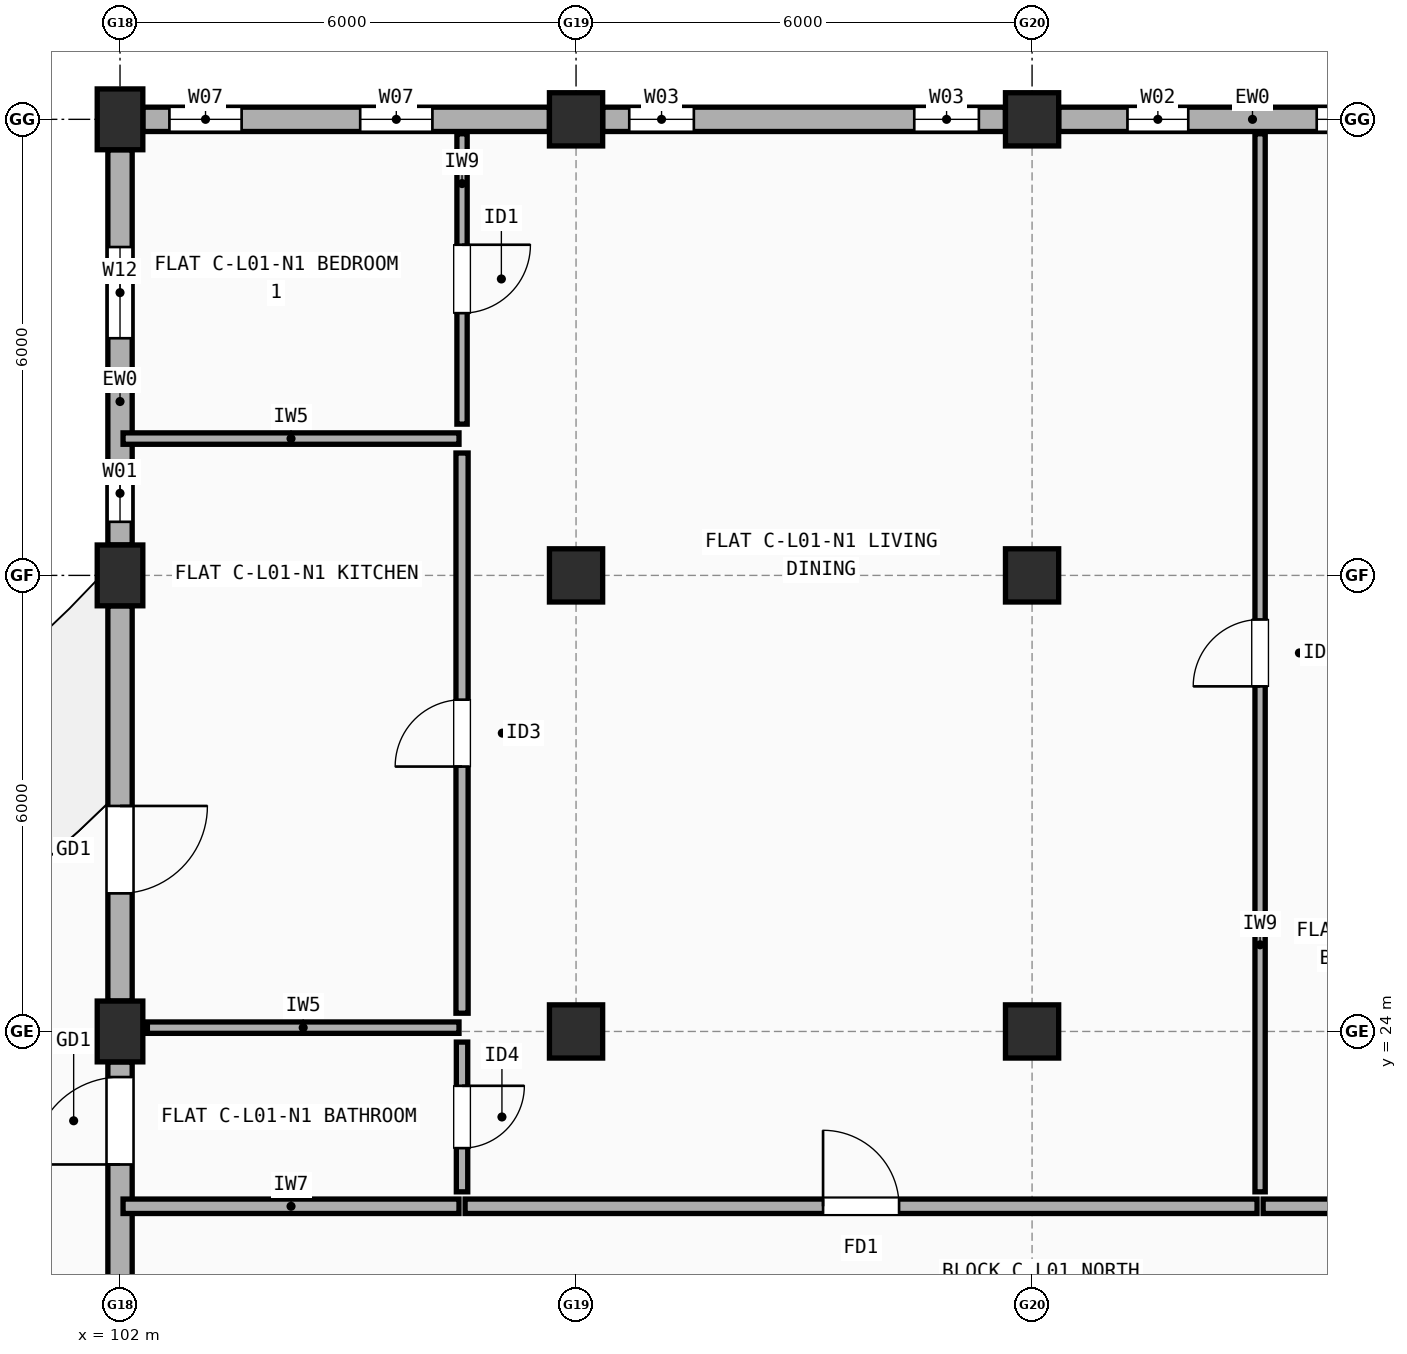
"""IFC4 building model, lengths in metres.
Left out: names, types, materials, properties, quantities, classifications, styles, units other than length and angle.
Written with IfcOpenShell. Run it as: python <this file> out.ifc"""

import sys

from ifc_helpers import new_model, si_unit, direction, frame, frame_2d, origin, origin_2d, place, context, subcontext, project, spatial, rectangle, extrude, element, fill, save


model = new_model("IFC4")
c1 = context("Model", 3, precision=1e-05, world=origin(), true_north=direction((0.0, 1.0)))
c2 = subcontext(c1, "Body", "Model", "MODEL_VIEW")
j1 = project(units=[si_unit("LENGTHUNIT", "METRE"), si_unit("PLANEANGLEUNIT", "RADIAN")], contexts=[c1])
p1 = place(None, origin())
s1 = spatial("IfcSite", under=j1, at=p1, CompositionType="ELEMENT")
p2 = place(p1, origin())
s2 = spatial("IfcBuilding", under=s1, at=p2, CompositionType="ELEMENT")
p3 = place(p2, frame((0.0, 0.0, 4.5)))
s3 = spatial("IfcBuildingStorey", under=s2, at=p3, CompositionType="ELEMENT", Elevation=4.5)
for number, where, z_axis, x_axis in (
    (1, (102.0, 24.0, 0.0), (0.0, 0.0, 1.0), (1.0, 0.0, 0.0)),
    (2, (102.0, 30.0, 0.0), (0.0, 0.0, 1.0), (1.0, 0.0, 0.0)),
    (3, (102.0, 36.0, 0.0), (0.0, 0.0, 1.0), (1.0, 0.0, 0.0)),
):
    element("IfcColumn", number, at=place(p3, frame(where, z_axis=z_axis, x_axis=x_axis)), inside=s3, PredefinedType="COLUMN", context=c2, shape_type="SweptSolid", body=[
        extrude(rectangle(XDim=0.6, YDim=0.8, at=origin_2d()), origin(), (0.0, 0.0, 1.0), 2.945),
    ])
for number, where, z_axis, x_axis in (
    (4, (108.0, 24.0, 0.0), (0.0, 0.0, 1.0), (1.0, 0.0, 0.0)),
    (5, (108.0, 30.0, 0.0), (0.0, 0.0, 1.0), (1.0, 0.0, 0.0)),
    (6, (108.0, 36.0, 0.0), (0.0, 0.0, 1.0), (1.0, 0.0, 0.0)),
    (7, (114.0, 24.0, 0.0), (0.0, 0.0, 1.0), (1.0, 0.0, 0.0)),
    (8, (114.0, 30.0, 0.0), (0.0, 0.0, 1.0), (1.0, 0.0, 0.0)),
    (9, (114.0, 36.0, 0.0), (0.0, 0.0, 1.0), (1.0, 0.0, 0.0)),
):
    element("IfcColumn", number, at=place(p3, frame(where, z_axis=z_axis, x_axis=x_axis)), inside=s3, PredefinedType="COLUMN", context=c2, shape_type="SweptSolid", body=[
        extrude(rectangle(XDim=0.7, YDim=0.7, at=origin_2d()), origin(), (0.0, 0.0, 1.0), 2.945),
    ])
p4 = place(p3, frame((119.65, 36.0, 0.0), z_axis=(0.0, 0.0, 1.0), x_axis=(-1.0, 0.0, 0.0)))
e10 = element("IfcWall", 10, at=p4, inside=s3, PredefinedType="STANDARD", context=c2, shape_type="SweptSolid", body=[
    extrude(rectangle(XDim=5.3, YDim=0.32, at=frame_2d((2.65, 0.0))), origin(), (0.0, 0.0, 1.0), 2.427),
])
p5 = place(p4, frame((0.705, 0.0, 0.9)))
e11 = element("IfcOpeningElement", 11, at=p5, cuts=e10, PredefinedType="OPENING", context=c2, shape_type="SweptSolid", body=[
    extrude(rectangle(XDim=1.2, YDim=1.35, at=frame_2d((0.6, 0.675))), frame((0.0, 0.17, 0.0), z_axis=(0.0, -1.0, 0.0), x_axis=(1.0, 0.0, 0.0)), (0.0, 0.0, 1.0), 0.34),
])
p6 = place(p4, frame((3.595, 0.0, 0.9)))
e12 = element("IfcOpeningElement", 12, at=p6, cuts=e10, PredefinedType="OPENING", context=c2, shape_type="SweptSolid", body=[
    extrude(rectangle(XDim=0.8, YDim=1.2, at=frame_2d((0.4, 0.6))), frame((0.0, 0.17, 0.0), z_axis=(0.0, -1.0, 0.0), x_axis=(1.0, 0.0, 0.0)), (0.0, 0.0, 1.0), 0.34),
])
p7 = place(p3, frame((113.65, 36.0, 0.0), z_axis=(0.0, 0.0, 1.0), x_axis=(-1.0, 0.0, 0.0)))
e13 = element("IfcWall", 13, at=p7, inside=s3, PredefinedType="STANDARD", context=c2, shape_type="SweptSolid", body=[
    extrude(rectangle(XDim=5.3, YDim=0.32, at=frame_2d((2.65, 0.0))), origin(), (0.0, 0.0, 1.0), 2.427),
])
p8 = place(p7, frame((0.35, 0.0, 0.9)))
e14 = element("IfcOpeningElement", 14, at=p8, cuts=e13, PredefinedType="OPENING", context=c2, shape_type="SweptSolid", body=[
    extrude(rectangle(XDim=0.85, YDim=1.25, at=frame_2d((0.425, 0.625))), frame((0.0, 0.17, 0.0), z_axis=(0.0, -1.0, 0.0), x_axis=(1.0, 0.0, 0.0)), (0.0, 0.0, 1.0), 0.34),
])
p9 = place(p7, frame((4.1, 0.0, 0.9)))
e15 = element("IfcOpeningElement", 15, at=p9, cuts=e13, PredefinedType="OPENING", context=c2, shape_type="SweptSolid", body=[
    extrude(rectangle(XDim=0.85, YDim=1.25, at=frame_2d((0.425, 0.625))), frame((0.0, 0.17, 0.0), z_axis=(0.0, -1.0, 0.0), x_axis=(1.0, 0.0, 0.0)), (0.0, 0.0, 1.0), 0.34),
])
p10 = place(p3, frame((107.65, 36.0, 0.0), z_axis=(0.0, 0.0, 1.0), x_axis=(-1.0, 0.0, 0.0)))
e16 = element("IfcWall", 16, at=p10, inside=s3, PredefinedType="STANDARD", context=c2, shape_type="SweptSolid", body=[
    extrude(rectangle(XDim=5.35, YDim=0.32, at=frame_2d((2.675, 0.0))), origin(), (0.0, 0.0, 1.0), 2.427),
])
p11 = place(p10, frame((1.54, 0.0, 0.9)))
e17 = element("IfcOpeningElement", 17, at=p11, cuts=e16, PredefinedType="OPENING", context=c2, shape_type="SweptSolid", body=[
    extrude(rectangle(XDim=0.95, YDim=1.35, at=frame_2d((0.475, 0.675))), frame((0.0, 0.17, 0.0), z_axis=(0.0, -1.0, 0.0), x_axis=(1.0, 0.0, 0.0)), (0.0, 0.0, 1.0), 0.34),
])
p12 = place(p10, frame((4.05, 0.0, 0.9)))
e18 = element("IfcOpeningElement", 18, at=p12, cuts=e16, PredefinedType="OPENING", context=c2, shape_type="SweptSolid", body=[
    extrude(rectangle(XDim=0.95, YDim=1.35, at=frame_2d((0.475, 0.675))), frame((0.0, 0.17, 0.0), z_axis=(0.0, -1.0, 0.0), x_axis=(1.0, 0.0, 0.0)), (0.0, 0.0, 1.0), 0.34),
])
p13 = place(p3, frame((102.0, 35.6, 0.0), z_axis=(0.0, 0.0, 1.0), x_axis=(0.0, -1.0, 0.0)))
e19 = element("IfcWall", 19, at=p13, inside=s3, PredefinedType="STANDARD", context=c2, shape_type="SweptSolid", body=[
    extrude(rectangle(XDim=5.2, YDim=0.32, at=frame_2d((2.6, 0.0))), origin(), (0.0, 0.0, 1.0), 2.427),
])
p14 = place(p13, frame((1.28, 0.0, 0.9)))
e20 = element("IfcOpeningElement", 20, at=p14, cuts=e19, PredefinedType="OPENING", context=c2, shape_type="SweptSolid", body=[
    extrude(rectangle(XDim=1.2, YDim=1.35, at=frame_2d((0.6, 0.675))), frame((0.0, 0.17, 0.0), z_axis=(0.0, -1.0, 0.0), x_axis=(1.0, 0.0, 0.0)), (0.0, 0.0, 1.0), 0.34),
])
p15 = place(p13, frame((4.145, 0.0, 0.9)))
e21 = element("IfcOpeningElement", 21, at=p15, cuts=e19, PredefinedType="OPENING", context=c2, shape_type="SweptSolid", body=[
    extrude(rectangle(XDim=0.75, YDim=1.15, at=frame_2d((0.375, 0.575))), frame((0.0, 0.17, 0.0), z_axis=(0.0, -1.0, 0.0), x_axis=(1.0, 0.0, 0.0)), (0.0, 0.0, 1.0), 0.34),
])
p16 = place(p3, frame((102.0, 29.6, 0.0), z_axis=(0.0, 0.0, 1.0), x_axis=(0.0, -1.0, 0.0)))
e22 = element("IfcWall", 22, at=p16, inside=s3, PredefinedType="STANDARD", context=c2, shape_type="SweptSolid", body=[
    extrude(rectangle(XDim=5.2, YDim=0.32, at=frame_2d((2.6, 0.0))), origin(), (0.0, 0.0, 1.0), 2.427),
])
p17 = place(p16, frame((2.633, 0.0, 0.0)))
e23 = element("IfcOpeningElement", 23, at=p17, cuts=e22, PredefinedType="OPENING", context=c2, shape_type="SweptSolid", body=[
    extrude(rectangle(XDim=1.15, YDim=2.15, at=frame_2d((0.575, 1.075))), frame((0.0, 0.17, 0.0), z_axis=(0.0, -1.0, 0.0), x_axis=(1.0, 0.0, 0.0)), (0.0, 0.0, 1.0), 0.34),
])
p18 = place(p3, frame((102.0, 23.6, 0.0), z_axis=(0.0, 0.0, 1.0), x_axis=(0.0, -1.0, 0.0)))
e24 = element("IfcWall", 24, at=p18, inside=s3, PredefinedType="STANDARD", context=c2, shape_type="SweptSolid", body=[
    extrude(rectangle(XDim=5.2, YDim=0.32, at=frame_2d((2.6, 0.0))), origin(), (0.0, 0.0, 1.0), 2.427),
])
p19 = place(p18, frame((0.2, 0.0, 0.0)))
e25 = element("IfcOpeningElement", 25, at=p19, cuts=e24, PredefinedType="OPENING", context=c2, shape_type="SweptSolid", body=[
    extrude(rectangle(XDim=1.15, YDim=2.15, at=frame_2d((0.575, 1.075))), frame((0.0, 0.17, 0.0), z_axis=(0.0, -1.0, 0.0), x_axis=(1.0, 0.0, 0.0)), (0.0, 0.0, 1.0), 0.34),
])
p20 = place(p18, frame((3.145, 0.0, 0.9)))
e26 = element("IfcOpeningElement", 26, at=p20, cuts=e24, PredefinedType="OPENING", context=c2, shape_type="SweptSolid", body=[
    extrude(rectangle(XDim=0.85, YDim=1.25, at=frame_2d((0.425, 0.625))), frame((0.0, 0.17, 0.0), z_axis=(0.0, -1.0, 0.0), x_axis=(1.0, 0.0, 0.0)), (0.0, 0.0, 1.0), 0.34),
])
p21 = place(p3, frame((102.04, 21.7, 0.0), z_axis=(0.0, 0.0, 1.0), x_axis=(1.0, 0.0, 0.0)))
e27 = element("IfcWall", 27, at=p21, inside=s3, PredefinedType="SOLIDWALL", context=c2, shape_type="SweptSolid", body=[
    extrude(rectangle(XDim=4.42, YDim=0.19, at=frame_2d((2.21, 0.0))), origin(), (0.0, 0.0, 1.0), 2.427),
])
p22 = place(p3, frame((106.54, 21.7, 0.0), z_axis=(0.0, 0.0, 1.0), x_axis=(1.0, 0.0, 0.0)))
e28 = element("IfcWall", 28, at=p22, inside=s3, PredefinedType="SOLIDWALL", context=c2, shape_type="SweptSolid", body=[
    extrude(rectangle(XDim=10.42, YDim=0.19, at=frame_2d((5.21, 0.0))), origin(), (0.0, 0.0, 1.0), 2.508),
])
p23 = place(p22, frame((4.71, 0.0, 0.0)))
e29 = element("IfcOpeningElement", 29, at=p23, cuts=e28, PredefinedType="OPENING", context=c2, shape_type="SweptSolid", body=[
    extrude(rectangle(XDim=1.0, YDim=2.15, at=frame_2d((0.5, 1.075))), frame((0.0, 0.105, 0.0), z_axis=(0.0, -1.0, 0.0), x_axis=(1.0, 0.0, 0.0)), (0.0, 0.0, 1.0), 0.21),
])
p24 = place(p3, frame((106.5, 31.99, 0.0), z_axis=(0.0, 0.0, 1.0), x_axis=(0.0, 1.0, 0.0)))
e30 = element("IfcWall", 30, at=p24, inside=s3, PredefinedType="PARTITIONING", context=c2, shape_type="SweptSolid", body=[
    extrude(rectangle(XDim=3.82, YDim=0.135, at=frame_2d((1.91, 0.0))), origin(), (0.0, 0.0, 1.0), 2.945),
])
p25 = place(p24, frame((1.46, 0.0, 0.0)))
e31 = element("IfcOpeningElement", 31, at=p25, cuts=e30, PredefinedType="OPENING", context=c2, shape_type="SweptSolid", body=[
    extrude(rectangle(XDim=0.9, YDim=2.1, at=frame_2d((0.45, 1.05))), frame((0.0, 0.077, 0.0), z_axis=(0.0, -1.0, 0.0), x_axis=(1.0, 0.0, 0.0)), (0.0, 0.0, 1.0), 0.155),
])
p26 = place(p3, frame((106.5, 24.24, 0.0), z_axis=(0.0, 0.0, 1.0), x_axis=(0.0, 1.0, 0.0)))
e32 = element("IfcWall", 32, at=p26, inside=s3, PredefinedType="PLUMBINGWALL", context=c2, shape_type="SweptSolid", body=[
    extrude(rectangle(XDim=7.37, YDim=0.16, at=frame_2d((3.685, 0.0))), origin(), (0.0, 0.0, 1.0), 2.427),
])
p27 = place(p26, frame((3.245, 0.0, 0.0)))
e33 = element("IfcOpeningElement", 33, at=p27, cuts=e32, PredefinedType="OPENING", context=c2, shape_type="SweptSolid", body=[
    extrude(rectangle(XDim=0.88, YDim=2.1, at=frame_2d((0.44, 1.05))), frame((0.0, 0.09, 0.0), z_axis=(0.0, -1.0, 0.0), x_axis=(1.0, 0.0, 0.0)), (0.0, 0.0, 1.0), 0.18),
])
p28 = place(p3, frame((106.5, 21.89, 0.0), z_axis=(0.0, 0.0, 1.0), x_axis=(0.0, 1.0, 0.0)))
e34 = element("IfcWall", 34, at=p28, inside=s3, PredefinedType="PARTITIONING", context=c2, shape_type="SweptSolid", body=[
    extrude(rectangle(XDim=1.97, YDim=0.15, at=frame_2d((0.985, 0.0))), origin(), (0.0, 0.0, 1.0), 2.945),
])
p29 = place(p28, frame((0.575, 0.0, 0.0)))
e35 = element("IfcOpeningElement", 35, at=p29, cuts=e34, PredefinedType="OPENING", context=c2, shape_type="SweptSolid", body=[
    extrude(rectangle(XDim=0.82, YDim=2.08, at=frame_2d((0.41, 1.04))), frame((0.0, 0.085, 0.0), z_axis=(0.0, -1.0, 0.0), x_axis=(1.0, 0.0, 0.0)), (0.0, 0.0, 1.0), 0.17),
])
p30 = place(p3, frame((102.04, 31.8, 0.0), z_axis=(0.0, 0.0, 1.0), x_axis=(1.0, 0.0, 0.0)))
e36 = element("IfcWall", 36, at=p30, inside=s3, PredefinedType="PARTITIONING", context=c2, shape_type="SweptSolid", body=[
    extrude(rectangle(XDim=4.42, YDim=0.15, at=frame_2d((2.21, 0.0))), origin(), (0.0, 0.0, 1.0), 2.427),
])
p31 = place(p3, frame((102.36, 24.05, 0.0), z_axis=(0.0, 0.0, 1.0), x_axis=(1.0, 0.0, 0.0)))
e37 = element("IfcWall", 37, at=p31, inside=s3, PredefinedType="PARTITIONING", context=c2, shape_type="SweptSolid", body=[
    extrude(rectangle(XDim=4.1, YDim=0.15, at=frame_2d((2.05, 0.0))), origin(), (0.0, 0.0, 1.0), 2.377),
])
p32 = place(p3, frame((117.04, 21.7, 0.0), z_axis=(0.0, 0.0, 1.0), x_axis=(1.0, 0.0, 0.0)))
e38 = element("IfcWall", 38, at=p32, inside=s3, PredefinedType="SOLIDWALL", context=c2, shape_type="SweptSolid", body=[
    extrude(rectangle(XDim=2.92, YDim=0.19, at=frame_2d((1.46, 0.0))), origin(), (0.0, 0.0, 1.0), 2.945),
])
p33 = place(p3, frame((117.0, 21.89, 0.0), z_axis=(0.0, 0.0, 1.0), x_axis=(0.0, 1.0, 0.0)))
e39 = element("IfcWall", 39, at=p33, inside=s3, PredefinedType="PARTITIONING", context=c2, shape_type="SweptSolid", body=[
    extrude(rectangle(XDim=13.92, YDim=0.135, at=frame_2d((6.96, 0.0))), origin(), (0.0, 0.0, 1.0), 2.377),
])
p34 = place(p33, frame((6.65, 0.0, 0.0)))
e40 = element("IfcOpeningElement", 40, at=p34, cuts=e39, PredefinedType="OPENING", context=c2, shape_type="SweptSolid", body=[
    extrude(rectangle(XDim=0.88, YDim=2.1, at=frame_2d((0.44, 1.05))), frame((0.0, 0.077, 0.0), z_axis=(0.0, -1.0, 0.0), x_axis=(1.0, 0.0, 0.0)), (0.0, 0.0, 1.0), 0.155),
])
p35 = place(p5, origin())
e41 = element("IfcWindow", 41, at=p35, inside=s3, PartitioningType="SINGLE_PANEL", PredefinedType="WINDOW", context=c2, shape_type="SweptSolid", body=[
    extrude(rectangle(XDim=1.2, YDim=1.35, at=frame_2d((0.6, 0.675))), frame((0.0, 0.03, 0.0), z_axis=(0.0, -1.0, 0.0), x_axis=(1.0, 0.0, 0.0)), (0.0, 0.0, 1.0), 0.06),
])
fill(e11, e41)
p36 = place(p6, origin())
e42 = element("IfcWindow", 42, at=p36, inside=s3, PartitioningType="SINGLE_PANEL", PredefinedType="WINDOW", context=c2, shape_type="SweptSolid", body=[
    extrude(rectangle(XDim=0.8, YDim=1.2, at=frame_2d((0.4, 0.6))), frame((0.0, 0.03, 0.0), z_axis=(0.0, -1.0, 0.0), x_axis=(1.0, 0.0, 0.0)), (0.0, 0.0, 1.0), 0.06),
])
fill(e12, e42)
p37 = place(p8, origin())
e43 = element("IfcWindow", 43, at=p37, inside=s3, PartitioningType="SINGLE_PANEL", PredefinedType="WINDOW", context=c2, shape_type="SweptSolid", body=[
    extrude(rectangle(XDim=0.85, YDim=1.25, at=frame_2d((0.425, 0.625))), frame((0.0, 0.03, 0.0), z_axis=(0.0, -1.0, 0.0), x_axis=(1.0, 0.0, 0.0)), (0.0, 0.0, 1.0), 0.06),
])
fill(e14, e43)
p38 = place(p9, origin())
e44 = element("IfcWindow", 44, at=p38, inside=s3, PartitioningType="SINGLE_PANEL", PredefinedType="WINDOW", context=c2, shape_type="SweptSolid", body=[
    extrude(rectangle(XDim=0.85, YDim=1.25, at=frame_2d((0.425, 0.625))), frame((0.0, 0.03, 0.0), z_axis=(0.0, -1.0, 0.0), x_axis=(1.0, 0.0, 0.0)), (0.0, 0.0, 1.0), 0.06),
])
fill(e15, e44)
p39 = place(p11, origin())
e45 = element("IfcWindow", 45, at=p39, inside=s3, PartitioningType="SINGLE_PANEL", PredefinedType="WINDOW", context=c2, shape_type="SweptSolid", body=[
    extrude(rectangle(XDim=0.95, YDim=1.35, at=frame_2d((0.475, 0.675))), frame((0.0, 0.03, 0.0), z_axis=(0.0, -1.0, 0.0), x_axis=(1.0, 0.0, 0.0)), (0.0, 0.0, 1.0), 0.06),
])
fill(e17, e45)
p40 = place(p12, origin())
e46 = element("IfcWindow", 46, at=p40, inside=s3, PartitioningType="SINGLE_PANEL", PredefinedType="WINDOW", context=c2, shape_type="SweptSolid", body=[
    extrude(rectangle(XDim=0.95, YDim=1.35, at=frame_2d((0.475, 0.675))), frame((0.0, 0.03, 0.0), z_axis=(0.0, -1.0, 0.0), x_axis=(1.0, 0.0, 0.0)), (0.0, 0.0, 1.0), 0.06),
])
fill(e18, e46)
p41 = place(p14, origin())
e47 = element("IfcWindow", 47, at=p41, inside=s3, PartitioningType="SINGLE_PANEL", PredefinedType="WINDOW", context=c2, shape_type="SweptSolid", body=[
    extrude(rectangle(XDim=1.2, YDim=1.35, at=frame_2d((0.6, 0.675))), frame((0.0, 0.03, 0.0), z_axis=(0.0, -1.0, 0.0), x_axis=(1.0, 0.0, 0.0)), (0.0, 0.0, 1.0), 0.06),
])
fill(e20, e47)
p42 = place(p15, origin())
e48 = element("IfcWindow", 48, at=p42, inside=s3, PartitioningType="SINGLE_PANEL", PredefinedType="WINDOW", context=c2, shape_type="SweptSolid", body=[
    extrude(rectangle(XDim=0.75, YDim=1.15, at=frame_2d((0.375, 0.575))), frame((0.0, 0.03, 0.0), z_axis=(0.0, -1.0, 0.0), x_axis=(1.0, 0.0, 0.0)), (0.0, 0.0, 1.0), 0.06),
])
fill(e21, e48)
p43 = place(p17, frame((1.15, 0.0, 0.0), z_axis=(0.0, 0.0, 1.0), x_axis=(-1.0, 0.0, 0.0)))
e49 = element("IfcDoor", 49, at=p43, inside=s3, OperationType="SINGLE_SWING_LEFT", PredefinedType="DOOR", context=c2, shape_type="SweptSolid", body=[
    extrude(rectangle(XDim=1.15, YDim=2.15, at=frame_2d((0.575, 1.075))), frame((0.0, 0.025, 0.0), z_axis=(0.0, -1.0, 0.0), x_axis=(1.0, 0.0, 0.0)), (0.0, 0.0, 1.0), 0.05),
])
fill(e23, e49)
p44 = place(p19, frame((1.15, 0.0, 0.0), z_axis=(0.0, 0.0, 1.0), x_axis=(-1.0, 0.0, 0.0)))
e50 = element("IfcDoor", 50, at=p44, inside=s3, OperationType="SINGLE_SWING_RIGHT", PredefinedType="DOOR", context=c2, shape_type="SweptSolid", body=[
    extrude(rectangle(XDim=1.15, YDim=2.15, at=frame_2d((0.575, 1.075))), frame((0.0, 0.025, 0.0), z_axis=(0.0, -1.0, 0.0), x_axis=(1.0, 0.0, 0.0)), (0.0, 0.0, 1.0), 0.05),
])
fill(e25, e50)
p45 = place(p23, origin())
e51 = element("IfcDoor", 51, at=p45, inside=s3, OperationType="SINGLE_SWING_LEFT", PredefinedType="DOOR", context=c2, shape_type="SweptSolid", body=[
    extrude(rectangle(XDim=1.0, YDim=2.15, at=frame_2d((0.5, 1.075))), frame((0.0, 0.025, 0.0), z_axis=(0.0, -1.0, 0.0), x_axis=(1.0, 0.0, 0.0)), (0.0, 0.0, 1.0), 0.05),
])
fill(e29, e51)
p46 = place(p25, origin())
e52 = element("IfcDoor", 52, at=p46, inside=s3, OperationType="SINGLE_SWING_RIGHT", PredefinedType="DOOR", context=c2, shape_type="SweptSolid", body=[
    extrude(rectangle(XDim=0.9, YDim=2.1, at=frame_2d((0.45, 1.05))), frame((0.0, 0.025, 0.0), z_axis=(0.0, -1.0, 0.0), x_axis=(1.0, 0.0, 0.0)), (0.0, 0.0, 1.0), 0.05),
])
fill(e31, e52)
p47 = place(p27, origin())
e53 = element("IfcDoor", 53, at=p47, inside=s3, OperationType="SINGLE_SWING_LEFT", PredefinedType="DOOR", context=c2, shape_type="SweptSolid", body=[
    extrude(rectangle(XDim=0.88, YDim=2.1, at=frame_2d((0.44, 1.05))), frame((0.0, 0.025, 0.0), z_axis=(0.0, -1.0, 0.0), x_axis=(1.0, 0.0, 0.0)), (0.0, 0.0, 1.0), 0.05),
])
fill(e33, e53)
p48 = place(p29, origin())
e54 = element("IfcDoor", 54, at=p48, inside=s3, OperationType="SINGLE_SWING_RIGHT", PredefinedType="DOOR", context=c2, shape_type="SweptSolid", body=[
    extrude(rectangle(XDim=0.82, YDim=2.08, at=frame_2d((0.41, 1.04))), frame((0.0, 0.025, 0.0), z_axis=(0.0, -1.0, 0.0), x_axis=(1.0, 0.0, 0.0)), (0.0, 0.0, 1.0), 0.05),
])
fill(e35, e54)
p49 = place(p34, origin())
e55 = element("IfcDoor", 55, at=p49, inside=s3, OperationType="SINGLE_SWING_LEFT", PredefinedType="DOOR", context=c2, shape_type="SweptSolid", body=[
    extrude(rectangle(XDim=0.88, YDim=2.1, at=frame_2d((0.44, 1.05))), frame((0.0, 0.025, 0.0), z_axis=(0.0, -1.0, 0.0), x_axis=(1.0, 0.0, 0.0)), (0.0, 0.0, 1.0), 0.05),
])
fill(e40, e55)
save(model, sys.argv[1])
